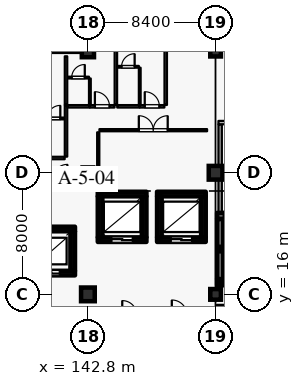
"""IFC4 building model, lengths in metres.
Left out: names, types, materials, properties, quantities, classifications, styles, units other than length and angle.
Written with IfcOpenShell. Run it as: python <this file> out.ifc"""

import sys

from ifc_helpers import new_model, si_unit, direction, frame, frame_2d, origin, origin_2d, place, context, subcontext, project, spatial, rectangle, hollow_rectangle, extrude, element, fill, save


model = new_model("IFC4")
c1 = context("Model", 3, precision=1e-05, world=origin(), true_north=direction((0.0, 1.0)))
c2 = subcontext(c1, "Body", "Model", "MODEL_VIEW")
j1 = project(units=[si_unit("LENGTHUNIT", "METRE"), si_unit("PLANEANGLEUNIT", "RADIAN")], contexts=[c1])
p1 = place(None, origin())
s1 = spatial("IfcSite", under=j1, at=p1, CompositionType="ELEMENT")
p2 = place(p1, origin())
s2 = spatial("IfcBuilding", under=s1, at=p2, CompositionType="ELEMENT")
p3 = place(p2, frame((0.0, 0.0, 16.2)))
s3 = spatial("IfcBuildingStorey", under=s2, at=p3, CompositionType="ELEMENT", Elevation=16.2)
p4 = place(p3, frame((142.8, 16.0, 0.0), z_axis=(0.0, 0.0, 1.0), x_axis=(1.0, 0.0, 0.0)))
e1 = element("IfcColumn", 1, at=p4, inside=s3, PredefinedType="COLUMN", context=c2, shape_type="SweptSolid", body=[
    extrude(rectangle(XDim=0.9, YDim=0.9, at=origin_2d()), origin(), (0.0, 0.0, 1.0), 4.8),
])
p5 = place(p3, frame((142.8, 32.0, 0.0), z_axis=(0.0, 0.0, 1.0), x_axis=(1.0, 0.0, 0.0)))
e2 = element("IfcColumn", 2, at=p5, inside=s3, PredefinedType="COLUMN", context=c2, shape_type="SweptSolid", body=[
    extrude(rectangle(XDim=0.8, YDim=0.8, at=origin_2d()), origin(), (0.0, 0.0, 1.0), 4.8),
])
p6 = place(p3, frame((151.2, 24.0, 0.0), z_axis=(0.0, 0.0, 1.0), x_axis=(1.0, 0.0, 0.0)))
e3 = element("IfcColumn", 3, at=p6, inside=s3, PredefinedType="COLUMN", context=c2, shape_type="SweptSolid", body=[
    extrude(rectangle(XDim=0.9, YDim=0.9, at=origin_2d()), origin(), (0.0, 0.0, 1.0), 4.8),
])
for number, where, z_axis, x_axis in (
    (4, (142.8, 24.0, 0.0), (0.0, 0.0, 1.0), (1.0, 0.0, 0.0)),
    (5, (151.2, 16.0, 0.0), (0.0, 0.0, 1.0), (1.0, 0.0, 0.0)),
    (6, (151.2, 32.0, 0.0), (0.0, 0.0, 1.0), (1.0, 0.0, 0.0)),
):
    element("IfcColumn", number, at=place(p3, frame(where, z_axis=z_axis, x_axis=x_axis)), inside=s3, PredefinedType="COLUMN", context=c2, shape_type="SweptSolid", body=[
        extrude(rectangle(XDim=0.7, YDim=0.7, at=origin_2d()), origin(), (0.0, 0.0, 1.0), 4.8),
    ])
p7 = place(p3, frame((134.8, 32.0, 0.0), z_axis=(0.0, 0.0, 1.0), x_axis=(1.0, 0.0, 0.0)))
e7 = element("IfcWall", 7, at=p7, inside=s3, PredefinedType="SOLIDWALL", context=c2, shape_type="SweptSolid", body=[
    extrude(rectangle(XDim=7.6, YDim=0.24, at=frame_2d((3.8, 0.0))), origin(), (0.0, 0.0, 1.0), 4.13),
])
p8 = place(p7, frame((0.84, 0.0, 0.8)))
e8 = element("IfcOpeningElement", 8, at=p8, cuts=e7, PredefinedType="OPENING", context=c2, shape_type="SweptSolid", body=[
    extrude(rectangle(XDim=1.6, YDim=1.6, at=frame_2d((0.8, 0.8))), frame((0.0, 0.13, 0.0), z_axis=(0.0, -1.0, 0.0), x_axis=(1.0, 0.0, 0.0)), (0.0, 0.0, 1.0), 0.26),
])
p9 = place(p7, frame((4.12, 0.0, 0.8)))
e9 = element("IfcOpeningElement", 9, at=p9, cuts=e7, PredefinedType="OPENING", context=c2, shape_type="SweptSolid", body=[
    extrude(rectangle(XDim=1.6, YDim=1.6, at=frame_2d((0.8, 0.8))), frame((0.0, 0.13, 0.0), z_axis=(0.0, -1.0, 0.0), x_axis=(1.0, 0.0, 0.0)), (0.0, 0.0, 1.0), 0.26),
])
p10 = place(p3, frame((138.85, 17.4, 0.0), z_axis=(0.0, 0.0, 1.0), x_axis=(1.0, 0.0, 0.0)))
e10 = element("IfcWall", 10, at=p10, inside=s3, PredefinedType="SHEAR", context=c2, shape_type="SweptSolid", body=[
    extrude(rectangle(XDim=3.1, YDim=0.3, at=frame_2d((1.55, 0.0))), origin(), (0.0, 0.0, 1.0), 4.535),
])
p11 = place(p10, frame((1.0, 0.0, 0.0)))
e11 = element("IfcOpeningElement", 11, at=p11, cuts=e10, PredefinedType="OPENING", context=c2, shape_type="SweptSolid", body=[
    extrude(rectangle(XDim=1.1, YDim=2.2, at=frame_2d((0.55, 1.1))), frame((0.0, 0.16, 0.0), z_axis=(0.0, -1.0, 0.0), x_axis=(1.0, 0.0, 0.0)), (0.0, 0.0, 1.0), 0.32),
])
p12 = place(p3, frame((141.8, 17.555, 0.0), z_axis=(0.0, 0.0, 1.0), x_axis=(0.0, 1.0, 0.0)))
e12 = element("IfcWall", 12, at=p12, inside=s3, PredefinedType="SHEAR", context=c2, shape_type="SweptSolid", body=[
    extrude(rectangle(XDim=2.59, YDim=0.3, at=frame_2d((1.295, 0.0))), origin(), (0.0, 0.0, 1.0), 4.535),
])
p13 = place(p3, frame((141.95, 20.3, 0.0), z_axis=(0.0, 0.0, 1.0), x_axis=(-1.0, 0.0, 0.0)))
e13 = element("IfcWall", 13, at=p13, inside=s3, PredefinedType="SHEAR", context=c2, shape_type="SweptSolid", body=[
    extrude(rectangle(XDim=3.1, YDim=0.3, at=frame_2d((1.55, 0.0))), origin(), (0.0, 0.0, 1.0), 4.535),
])
p14 = place(p3, frame((143.45, 19.6, 0.0), z_axis=(0.0, 0.0, 1.0), x_axis=(1.0, 0.0, 0.0)))
e14 = element("IfcWall", 14, at=p14, inside=s3, PredefinedType="SHEAR", context=c2, shape_type="SweptSolid", body=[
    extrude(rectangle(XDim=3.2, YDim=0.3, at=frame_2d((1.6, 0.0))), origin(), (0.0, 0.0, 1.0), 4.535),
])
p15 = place(p14, frame((0.9, 0.0, 0.0)))
e15 = element("IfcOpeningElement", 15, at=p15, cuts=e14, PredefinedType="OPENING", context=c2, shape_type="SweptSolid", body=[
    extrude(rectangle(XDim=1.4, YDim=2.35, at=frame_2d((0.7, 1.175))), frame((0.0, 0.16, 0.0), z_axis=(0.0, -1.0, 0.0), x_axis=(1.0, 0.0, 0.0)), (0.0, 0.0, 1.0), 0.32),
])
p16 = place(p3, frame((146.5, 19.755, 0.0), z_axis=(0.0, 0.0, 1.0), x_axis=(0.0, 1.0, 0.0)))
e16 = element("IfcWall", 16, at=p16, inside=s3, PredefinedType="SHEAR", context=c2, shape_type="SweptSolid", body=[
    extrude(rectangle(XDim=2.69, YDim=0.3, at=frame_2d((1.345, 0.0))), origin(), (0.0, 0.0, 1.0), 4.535),
])
p17 = place(p3, frame((146.65, 22.6, 0.0), z_axis=(0.0, 0.0, 1.0), x_axis=(-1.0, 0.0, 0.0)))
e17 = element("IfcWall", 17, at=p17, inside=s3, PredefinedType="SHEAR", context=c2, shape_type="SweptSolid", body=[
    extrude(rectangle(XDim=3.2, YDim=0.3, at=frame_2d((1.6, 0.0))), origin(), (0.0, 0.0, 1.0), 4.535),
])
p18 = place(p3, frame((143.6, 22.445, 0.0), z_axis=(0.0, 0.0, 1.0), x_axis=(0.0, -1.0, 0.0)))
e18 = element("IfcWall", 18, at=p18, inside=s3, PredefinedType="SHEAR", context=c2, shape_type="SweptSolid", body=[
    extrude(rectangle(XDim=2.69, YDim=0.3, at=frame_2d((1.345, 0.0))), origin(), (0.0, 0.0, 1.0), 4.535),
])
p19 = place(p3, frame((147.35, 19.6, 0.0), z_axis=(0.0, 0.0, 1.0), x_axis=(1.0, 0.0, 0.0)))
e19 = element("IfcWall", 19, at=p19, inside=s3, PredefinedType="SHEAR", context=c2, shape_type="SweptSolid", body=[
    extrude(rectangle(XDim=3.2, YDim=0.3, at=frame_2d((1.6, 0.0))), origin(), (0.0, 0.0, 1.0), 4.535),
])
p20 = place(p19, frame((0.9, 0.0, 0.0)))
e20 = element("IfcOpeningElement", 20, at=p20, cuts=e19, PredefinedType="OPENING", context=c2, shape_type="SweptSolid", body=[
    extrude(rectangle(XDim=1.4, YDim=2.35, at=frame_2d((0.7, 1.175))), frame((0.0, 0.16, 0.0), z_axis=(0.0, -1.0, 0.0), x_axis=(1.0, 0.0, 0.0)), (0.0, 0.0, 1.0), 0.32),
])
p21 = place(p3, frame((150.4, 19.755, 0.0), z_axis=(0.0, 0.0, 1.0), x_axis=(0.0, 1.0, 0.0)))
e21 = element("IfcWall", 21, at=p21, inside=s3, PredefinedType="SHEAR", context=c2, shape_type="SweptSolid", body=[
    extrude(rectangle(XDim=2.69, YDim=0.3, at=frame_2d((1.345, 0.0))), origin(), (0.0, 0.0, 1.0), 4.535),
])
p22 = place(p3, frame((150.55, 22.6, 0.0), z_axis=(0.0, 0.0, 1.0), x_axis=(-1.0, 0.0, 0.0)))
e22 = element("IfcWall", 22, at=p22, inside=s3, PredefinedType="SHEAR", context=c2, shape_type="SweptSolid", body=[
    extrude(rectangle(XDim=3.2, YDim=0.3, at=frame_2d((1.6, 0.0))), origin(), (0.0, 0.0, 1.0), 4.535),
])
p23 = place(p3, frame((147.5, 22.445, 0.0), z_axis=(0.0, 0.0, 1.0), x_axis=(0.0, -1.0, 0.0)))
e23 = element("IfcWall", 23, at=p23, inside=s3, PredefinedType="SHEAR", context=c2, shape_type="SweptSolid", body=[
    extrude(rectangle(XDim=2.69, YDim=0.3, at=frame_2d((1.345, 0.0))), origin(), (0.0, 0.0, 1.0), 4.535),
])
p24 = place(p3, frame((151.3, 16.8, 0.0), z_axis=(0.0, 0.0, 1.0), x_axis=(1.0, 0.0, 0.0)))
e24 = element("IfcWall", 24, at=p24, inside=s3, PredefinedType="SHEAR", context=c2, shape_type="SweptSolid", body=[
    extrude(rectangle(XDim=8.2, YDim=0.4, at=frame_2d((4.1, 0.0))), origin(), (0.0, 0.0, 1.0), 4.535),
])
p25 = place(p3, frame((151.3, 21.16, 0.0), z_axis=(0.0, 0.0, 1.0), x_axis=(1.0, 0.0, 0.0)))
e25 = element("IfcWall", 25, at=p25, inside=s3, PredefinedType="SHEAR", context=c2, shape_type="SweptSolid", body=[
    extrude(rectangle(XDim=8.2, YDim=0.4, at=frame_2d((4.1, 0.0))), origin(), (0.0, 0.0, 1.0), 4.535),
])
p26 = place(p25, frame((0.43, 0.0, 0.0)))
e26 = element("IfcOpeningElement", 26, at=p26, cuts=e25, PredefinedType="OPENING", context=c2, shape_type="SweptSolid", body=[
    extrude(rectangle(XDim=1.16, YDim=2.2, at=frame_2d((0.58, 1.1))), frame((0.0, 0.21, 0.0), z_axis=(0.0, -1.0, 0.0), x_axis=(1.0, 0.0, 0.0)), (0.0, 0.0, 1.0), 0.42),
])
p27 = place(p3, frame((151.5, 17.005, 0.0), z_axis=(0.0, 0.0, 1.0), x_axis=(0.0, 1.0, 0.0)))
e27 = element("IfcWall", 27, at=p27, inside=s3, PredefinedType="SHEAR", context=c2, shape_type="SweptSolid", body=[
    extrude(rectangle(XDim=3.95, YDim=0.4, at=frame_2d((1.975, 0.0))), origin(), (0.0, 0.0, 1.0), 4.535),
])
p28 = place(p3, frame((151.5, 21.365, 0.0), z_axis=(0.0, 0.0, 1.0), x_axis=(0.0, 1.0, 0.0)))
e28 = element("IfcWall", 28, at=p28, inside=s3, PredefinedType="PARTITIONING", context=c2, shape_type="SweptSolid", body=[
    extrude(rectangle(XDim=5.82, YDim=0.22, at=frame_2d((2.91, 0.0))), origin(), (0.0, 0.0, 1.0), 4.535),
])
p29 = place(p3, frame((151.39, 27.3, 0.0), z_axis=(0.0, 0.0, 1.0), x_axis=(1.0, 0.0, 0.0)))
e29 = element("IfcWall", 29, at=p29, inside=s3, PredefinedType="PARTITIONING", context=c2, shape_type="SweptSolid", body=[
    extrude(rectangle(XDim=3.82, YDim=0.22, at=frame_2d((1.91, 0.0))), origin(), (0.0, 0.0, 1.0), 4.535),
])
p30 = place(p29, frame((1.35, 0.0, 0.0)))
e30 = element("IfcOpeningElement", 30, at=p30, cuts=e29, PredefinedType="OPENING", context=c2, shape_type="SweptSolid", body=[
    extrude(rectangle(XDim=1.12, YDim=2.2, at=frame_2d((0.56, 1.1))), frame((0.0, 0.12, 0.0), z_axis=(0.0, -1.0, 0.0), x_axis=(1.0, 0.0, 0.0)), (0.0, 0.0, 1.0), 0.24),
])
for number, where, z_axis, x_axis in (
    (31, (151.68, 16.8, 0.0), (0.0, 0.0, 1.0), (1.0, 0.0, 0.0)),
    (32, (151.68, 18.98, 0.0), (0.0, 0.0, 1.0), (1.0, 0.0, 0.0)),
):
    element("IfcColumn", number, at=place(p3, frame(where, z_axis=z_axis, x_axis=x_axis)), inside=s3, PredefinedType="COLUMN", context=c2, shape_type="SweptSolid", body=[
        extrude(hollow_rectangle(XDim=0.3, YDim=0.3, WallThickness=0.012, at=origin_2d()), origin(), (0.0, 0.0, 1.0), 4.62),
    ])
p31 = place(p3, frame((139.8, 24.97, 0.0), z_axis=(0.0, 0.0, 1.0), x_axis=(1.0, 0.0, 0.0)))
e33 = element("IfcWall", 33, at=p31, inside=s3, PredefinedType="PARTITIONING", context=c2, shape_type="SweptSolid", body=[
    extrude(rectangle(XDim=1.47, YDim=0.16, at=frame_2d((0.735, 0.0))), origin(), (0.0, 0.0, 1.0), 4.535),
])
p32 = place(p3, frame((139.85, 27.57, 0.0), z_axis=(0.0, 0.0, 1.0), x_axis=(1.0, 0.0, 0.0)))
e34 = element("IfcWall", 34, at=p32, inside=s3, PredefinedType="PARTITIONING", context=c2, shape_type="SweptSolid", body=[
    extrude(rectangle(XDim=1.41, YDim=0.115, at=frame_2d((0.705, 0.0))), origin(), (0.0, 0.0, 1.0), 4.535),
])
p33 = place(p32, frame((0.275, 0.0, 0.0)))
e35 = element("IfcOpeningElement", 35, at=p33, cuts=e34, PredefinedType="OPENING", context=c2, shape_type="SweptSolid", body=[
    extrude(rectangle(XDim=0.86, YDim=2.12, at=frame_2d((0.43, 1.06))), frame((0.0, 0.067, 0.0), z_axis=(0.0, -1.0, 0.0), x_axis=(1.0, 0.0, 0.0)), (0.0, 0.0, 1.0), 0.135),
])
p34 = place(p3, frame((141.36, 25.06, 0.0), z_axis=(0.0, 0.0, 1.0), x_axis=(0.0, 1.0, 0.0)))
e36 = element("IfcWall", 36, at=p34, inside=s3, PredefinedType="PARTITIONING", context=c2, shape_type="SweptSolid", body=[
    extrude(rectangle(XDim=3.39, YDim=0.16, at=frame_2d((1.695, 0.0))), origin(), (0.0, 0.0, 1.0), 4.535),
])
p35 = place(p3, frame((141.45, 28.37, 0.0), z_axis=(0.0, 0.0, 1.0), x_axis=(1.0, 0.0, 0.0)))
e37 = element("IfcWall", 37, at=p35, inside=s3, PredefinedType="PARTITIONING", context=c2, shape_type="SweptSolid", body=[
    extrude(rectangle(XDim=1.47, YDim=0.16, at=frame_2d((0.735, 0.0))), origin(), (0.0, 0.0, 1.0), 4.535),
])
p36 = place(p3, frame((142.93, 28.37, 0.0), z_axis=(0.0, 0.0, 1.0), x_axis=(1.0, 0.0, 0.0)))
e38 = element("IfcWall", 38, at=p36, inside=s3, PredefinedType="PARTITIONING", context=c2, shape_type="SweptSolid", body=[
    extrude(rectangle(XDim=1.62, YDim=0.16, at=frame_2d((0.81, 0.0))), origin(), (0.0, 0.0, 1.0), 4.535),
])
p37 = place(p36, frame((0.33, 0.0, 0.0)))
e39 = element("IfcOpeningElement", 39, at=p37, cuts=e38, PredefinedType="OPENING", context=c2, shape_type="SweptSolid", body=[
    extrude(rectangle(XDim=0.96, YDim=2.2, at=frame_2d((0.48, 1.1))), frame((0.0, 0.09, 0.0), z_axis=(0.0, -1.0, 0.0), x_axis=(1.0, 0.0, 0.0)), (0.0, 0.0, 1.0), 0.18),
])
p38 = place(p3, frame((142.93, 28.46, 0.0), z_axis=(0.0, 0.0, 1.0), x_axis=(0.0, 1.0, 0.0)))
e40 = element("IfcWall", 40, at=p38, inside=s3, PredefinedType="PARTITIONING", context=c2, shape_type="SweptSolid", body=[
    extrude(rectangle(XDim=1.74, YDim=0.115, at=frame_2d((0.87, 0.0))), origin(), (0.0, 0.0, 1.0), 4.535),
])
p39 = place(p3, frame((141.46, 30.26, 0.0), z_axis=(0.0, 0.0, 1.0), x_axis=(1.0, 0.0, 0.0)))
e41 = element("IfcWall", 41, at=p39, inside=s3, PredefinedType="PARTITIONING", context=c2, shape_type="SweptSolid", body=[
    extrude(rectangle(XDim=1.41, YDim=0.115, at=frame_2d((0.705, 0.0))), origin(), (0.0, 0.0, 1.0), 4.535),
])
p40 = place(p39, frame((0.275, 0.0, 0.0)))
e42 = element("IfcOpeningElement", 42, at=p40, cuts=e41, PredefinedType="OPENING", context=c2, shape_type="SweptSolid", body=[
    extrude(rectangle(XDim=0.86, YDim=2.12, at=frame_2d((0.43, 1.06))), frame((0.0, 0.067, 0.0), z_axis=(0.0, -1.0, 0.0), x_axis=(1.0, 0.0, 0.0)), (0.0, 0.0, 1.0), 0.135),
])
p41 = place(p3, frame((141.36, 28.46, 0.0), z_axis=(0.0, 0.0, 1.0), x_axis=(0.0, 1.0, 0.0)))
e43 = element("IfcWall", 43, at=p41, inside=s3, PredefinedType="PARTITIONING", context=c2, shape_type="SweptSolid", body=[
    extrude(rectangle(XDim=3.2, YDim=0.16, at=frame_2d((1.6, 0.0))), origin(), (0.0, 0.0, 1.0), 4.535),
])
p42 = place(p3, frame((144.73, 28.37, 0.0), z_axis=(0.0, 0.0, 1.0), x_axis=(1.0, 0.0, 0.0)))
e44 = element("IfcWall", 44, at=p42, inside=s3, PredefinedType="PARTITIONING", context=c2, shape_type="SweptSolid", body=[
    extrude(rectangle(XDim=1.47, YDim=0.16, at=frame_2d((0.735, 0.0))), origin(), (0.0, 0.0, 1.0), 4.535),
])
p43 = place(p3, frame((146.21, 28.37, 0.0), z_axis=(0.0, 0.0, 1.0), x_axis=(1.0, 0.0, 0.0)))
e45 = element("IfcWall", 45, at=p43, inside=s3, PredefinedType="PARTITIONING", context=c2, shape_type="SweptSolid", body=[
    extrude(rectangle(XDim=1.62, YDim=0.16, at=frame_2d((0.81, 0.0))), origin(), (0.0, 0.0, 1.0), 4.535),
])
p44 = place(p43, frame((0.33, 0.0, 0.0)))
e46 = element("IfcOpeningElement", 46, at=p44, cuts=e45, PredefinedType="OPENING", context=c2, shape_type="SweptSolid", body=[
    extrude(rectangle(XDim=0.96, YDim=2.2, at=frame_2d((0.48, 1.1))), frame((0.0, 0.09, 0.0), z_axis=(0.0, -1.0, 0.0), x_axis=(1.0, 0.0, 0.0)), (0.0, 0.0, 1.0), 0.18),
])
p45 = place(p3, frame((146.21, 28.46, 0.0), z_axis=(0.0, 0.0, 1.0), x_axis=(0.0, 1.0, 0.0)))
e47 = element("IfcWall", 47, at=p45, inside=s3, PredefinedType="PARTITIONING", context=c2, shape_type="SweptSolid", body=[
    extrude(rectangle(XDim=2.45, YDim=0.115, at=frame_2d((1.225, 0.0))), origin(), (0.0, 0.0, 1.0), 4.535),
])
p46 = place(p3, frame((144.74, 30.97, 0.0), z_axis=(0.0, 0.0, 1.0), x_axis=(1.0, 0.0, 0.0)))
e48 = element("IfcWall", 48, at=p46, inside=s3, PredefinedType="PARTITIONING", context=c2, shape_type="SweptSolid", body=[
    extrude(rectangle(XDim=1.41, YDim=0.115, at=frame_2d((0.705, 0.0))), origin(), (0.0, 0.0, 1.0), 4.535),
])
p47 = place(p46, frame((0.275, 0.0, 0.0)))
e49 = element("IfcOpeningElement", 49, at=p47, cuts=e48, PredefinedType="OPENING", context=c2, shape_type="SweptSolid", body=[
    extrude(rectangle(XDim=0.86, YDim=2.12, at=frame_2d((0.43, 1.06))), frame((0.0, 0.067, 0.0), z_axis=(0.0, -1.0, 0.0), x_axis=(1.0, 0.0, 0.0)), (0.0, 0.0, 1.0), 0.135),
])
p48 = place(p3, frame((144.64, 28.46, 0.0), z_axis=(0.0, 0.0, 1.0), x_axis=(0.0, 1.0, 0.0)))
e50 = element("IfcWall", 50, at=p48, inside=s3, PredefinedType="PARTITIONING", context=c2, shape_type="SweptSolid", body=[
    extrude(rectangle(XDim=4.95, YDim=0.16, at=frame_2d((2.475, 0.0))), origin(), (0.0, 0.0, 1.0), 4.535),
])
p49 = place(p3, frame((147.92, 28.46, 0.0), z_axis=(0.0, 0.0, 1.0), x_axis=(0.0, 1.0, 0.0)))
e51 = element("IfcWall", 51, at=p49, inside=s3, PredefinedType="PARTITIONING", context=c2, shape_type="SweptSolid", body=[
    extrude(rectangle(XDim=4.44, YDim=0.16, at=frame_2d((2.22, 0.0))), origin(), (0.0, 0.0, 1.0), 4.535),
])
p50 = place(p3, frame((151.29, 15.23, 0.0), z_axis=(0.0, 0.0, 1.0), x_axis=(1.0, 0.0, 0.0)))
e52 = element("IfcWall", 52, at=p50, inside=s3, PredefinedType="PARTITIONING", context=c2, shape_type="SweptSolid", body=[
    extrude(rectangle(XDim=1.47, YDim=0.16, at=frame_2d((0.735, 0.0))), origin(), (0.0, 0.0, 1.0), 4.535),
])
p51 = place(p3, frame((138.96, 23.6, 0.0), z_axis=(0.0, 0.0, 1.0), x_axis=(1.0, 0.0, 0.0)))
e53 = element("IfcWall", 53, at=p51, inside=s3, PredefinedType="PARTITIONING", context=c2, shape_type="SweptSolid", body=[
    extrude(rectangle(XDim=3.08, YDim=0.14, at=frame_2d((1.54, 0.0))), origin(), (0.0, 0.0, 1.0), 4.535),
])
p52 = place(p51, frame((0.59, 0.0, 0.0)))
e54 = element("IfcOpeningElement", 54, at=p52, cuts=e53, PredefinedType="OPENING", context=c2, shape_type="SweptSolid", body=[
    extrude(rectangle(XDim=1.9, YDim=2.4, at=frame_2d((0.95, 1.2))), frame((0.0, 0.08, 0.0), z_axis=(0.0, -1.0, 0.0), x_axis=(1.0, 0.0, 0.0)), (0.0, 0.0, 1.0), 0.16),
])
p53 = place(p3, frame((143.56, 26.8, 0.0), z_axis=(0.0, 0.0, 1.0), x_axis=(1.0, 0.0, 0.0)))
e55 = element("IfcWall", 55, at=p53, inside=s3, PredefinedType="PARTITIONING", context=c2, shape_type="SweptSolid", body=[
    extrude(rectangle(XDim=7.08, YDim=0.14, at=frame_2d((3.54, 0.0))), origin(), (0.0, 0.0, 1.0), 4.535),
])
p54 = place(p53, frame((2.59, 0.0, 0.0)))
e56 = element("IfcOpeningElement", 56, at=p54, cuts=e55, PredefinedType="OPENING", context=c2, shape_type="SweptSolid", body=[
    extrude(rectangle(XDim=1.9, YDim=2.4, at=frame_2d((0.95, 1.2))), frame((0.0, 0.08, 0.0), z_axis=(0.0, -1.0, 0.0), x_axis=(1.0, 0.0, 0.0)), (0.0, 0.0, 1.0), 0.16),
])
p55 = place(p3, frame((143.48, 23.45, 0.0), z_axis=(0.0, 0.0, 1.0), x_axis=(0.0, 1.0, 0.0)))
e57 = element("IfcWall", 57, at=p55, inside=s3, PredefinedType="PARTITIONING", context=c2, shape_type="SweptSolid", body=[
    extrude(rectangle(XDim=3.21, YDim=0.14, at=frame_2d((1.605, 0.0))), origin(), (0.0, 0.0, 1.0), 4.535),
])
p56 = place(p11, origin())
e58 = element("IfcDoor", 58, at=p56, inside=s3, OperationType="DOUBLE_DOOR_SLIDING", PredefinedType="DOOR", context=c2, shape_type="SweptSolid", body=[
    extrude(rectangle(XDim=1.1, YDim=2.2, at=frame_2d((0.55, 1.1))), frame((0.0, 0.025, 0.0), z_axis=(0.0, -1.0, 0.0), x_axis=(1.0, 0.0, 0.0)), (0.0, 0.0, 1.0), 0.05),
])
fill(e11, e58)
p57 = place(p15, origin())
e59 = element("IfcDoor", 59, at=p57, inside=s3, OperationType="DOUBLE_DOOR_SLIDING", PredefinedType="DOOR", context=c2, shape_type="SweptSolid", body=[
    extrude(rectangle(XDim=1.4, YDim=2.35, at=frame_2d((0.7, 1.175))), frame((0.0, 0.025, 0.0), z_axis=(0.0, -1.0, 0.0), x_axis=(1.0, 0.0, 0.0)), (0.0, 0.0, 1.0), 0.05),
])
fill(e15, e59)
p58 = place(p20, origin())
e60 = element("IfcDoor", 60, at=p58, inside=s3, OperationType="DOUBLE_DOOR_SLIDING", PredefinedType="DOOR", context=c2, shape_type="SweptSolid", body=[
    extrude(rectangle(XDim=1.4, YDim=2.35, at=frame_2d((0.7, 1.175))), frame((0.0, 0.025, 0.0), z_axis=(0.0, -1.0, 0.0), x_axis=(1.0, 0.0, 0.0)), (0.0, 0.0, 1.0), 0.05),
])
fill(e20, e60)
p59 = place(p26, origin())
e61 = element("IfcDoor", 61, at=p59, inside=s3, OperationType="SINGLE_SWING_RIGHT", PredefinedType="DOOR", context=c2, shape_type="SweptSolid", body=[
    extrude(rectangle(XDim=1.16, YDim=2.2, at=frame_2d((0.58, 1.1))), frame((0.0, 0.025, 0.0), z_axis=(0.0, -1.0, 0.0), x_axis=(1.0, 0.0, 0.0)), (0.0, 0.0, 1.0), 0.05),
])
fill(e26, e61)
p60 = place(p33, origin())
e62 = element("IfcDoor", 62, at=p60, inside=s3, OperationType="SINGLE_SWING_RIGHT", PredefinedType="DOOR", context=c2, shape_type="SweptSolid", body=[
    extrude(rectangle(XDim=0.86, YDim=2.12, at=frame_2d((0.43, 1.06))), frame((0.0, 0.025, 0.0), z_axis=(0.0, -1.0, 0.0), x_axis=(1.0, 0.0, 0.0)), (0.0, 0.0, 1.0), 0.05),
])
fill(e35, e62)
p61 = place(p37, origin())
e63 = element("IfcDoor", 63, at=p61, inside=s3, OperationType="SINGLE_SWING_LEFT", PredefinedType="DOOR", context=c2, shape_type="SweptSolid", body=[
    extrude(rectangle(XDim=0.96, YDim=2.2, at=frame_2d((0.48, 1.1))), frame((0.0, 0.025, 0.0), z_axis=(0.0, -1.0, 0.0), x_axis=(1.0, 0.0, 0.0)), (0.0, 0.0, 1.0), 0.05),
])
fill(e39, e63)
p62 = place(p40, origin())
e64 = element("IfcDoor", 64, at=p62, inside=s3, OperationType="SINGLE_SWING_RIGHT", PredefinedType="DOOR", context=c2, shape_type="SweptSolid", body=[
    extrude(rectangle(XDim=0.86, YDim=2.12, at=frame_2d((0.43, 1.06))), frame((0.0, 0.025, 0.0), z_axis=(0.0, -1.0, 0.0), x_axis=(1.0, 0.0, 0.0)), (0.0, 0.0, 1.0), 0.05),
])
fill(e42, e64)
p63 = place(p44, origin())
e65 = element("IfcDoor", 65, at=p63, inside=s3, OperationType="SINGLE_SWING_LEFT", PredefinedType="DOOR", context=c2, shape_type="SweptSolid", body=[
    extrude(rectangle(XDim=0.96, YDim=2.2, at=frame_2d((0.48, 1.1))), frame((0.0, 0.025, 0.0), z_axis=(0.0, -1.0, 0.0), x_axis=(1.0, 0.0, 0.0)), (0.0, 0.0, 1.0), 0.05),
])
fill(e46, e65)
p64 = place(p47, origin())
e66 = element("IfcDoor", 66, at=p64, inside=s3, OperationType="SINGLE_SWING_RIGHT", PredefinedType="DOOR", context=c2, shape_type="SweptSolid", body=[
    extrude(rectangle(XDim=0.86, YDim=2.12, at=frame_2d((0.43, 1.06))), frame((0.0, 0.025, 0.0), z_axis=(0.0, -1.0, 0.0), x_axis=(1.0, 0.0, 0.0)), (0.0, 0.0, 1.0), 0.05),
])
fill(e49, e66)
p65 = place(p52, origin())
e67 = element("IfcDoor", 67, at=p65, inside=s3, OperationType="DOUBLE_DOOR_SINGLE_SWING", PredefinedType="DOOR", context=c2, shape_type="SweptSolid", body=[
    extrude(rectangle(XDim=1.9, YDim=2.4, at=frame_2d((0.95, 1.2))), frame((0.0, 0.025, 0.0), z_axis=(0.0, -1.0, 0.0), x_axis=(1.0, 0.0, 0.0)), (0.0, 0.0, 1.0), 0.05),
])
fill(e54, e67)
p66 = place(p54, origin())
e68 = element("IfcDoor", 68, at=p66, inside=s3, OperationType="DOUBLE_DOOR_SINGLE_SWING", PredefinedType="DOOR", context=c2, shape_type="SweptSolid", body=[
    extrude(rectangle(XDim=1.9, YDim=2.4, at=frame_2d((0.95, 1.2))), frame((0.0, 0.025, 0.0), z_axis=(0.0, -1.0, 0.0), x_axis=(1.0, 0.0, 0.0)), (0.0, 0.0, 1.0), 0.05),
])
fill(e56, e68)
save(model, sys.argv[1])
